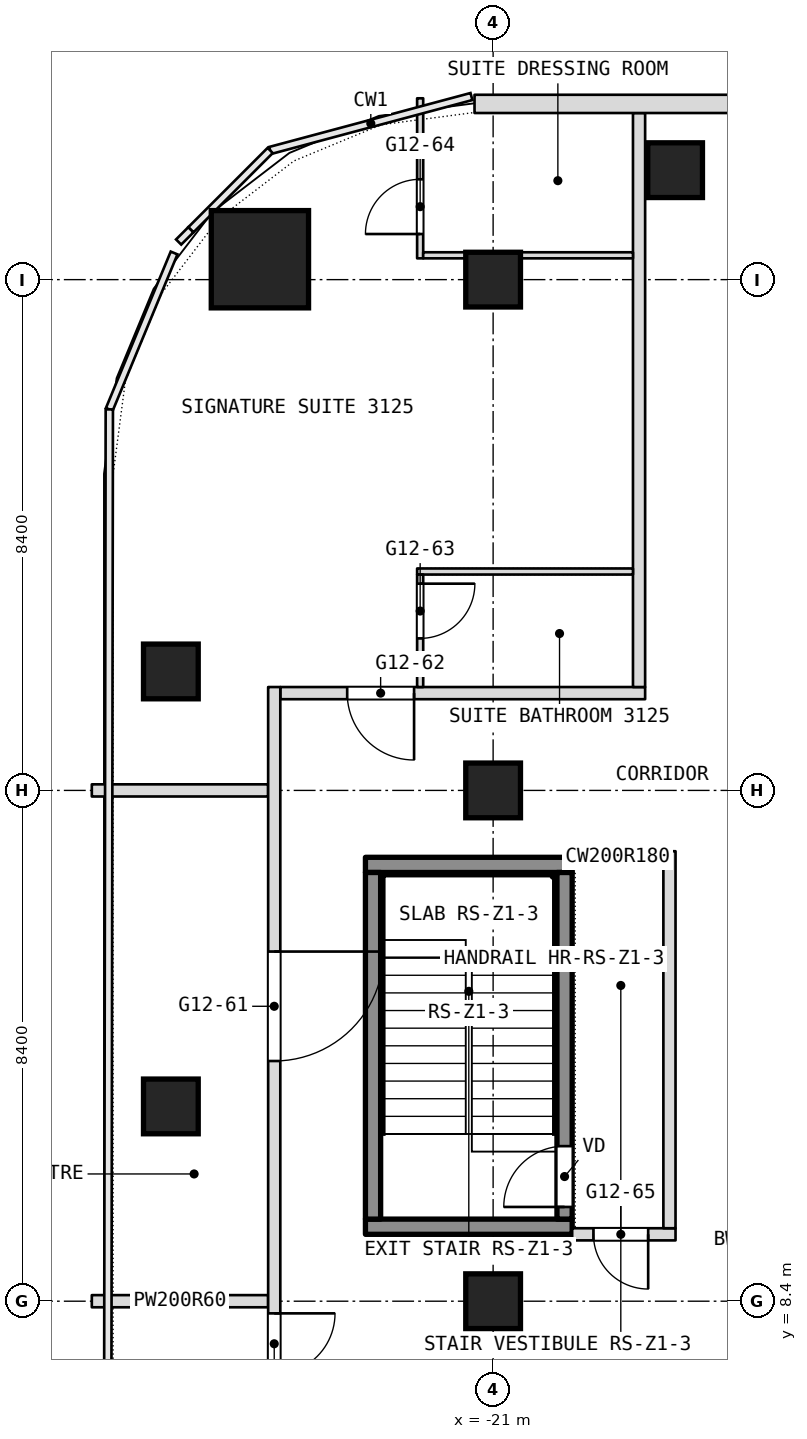
"""IFC4 building model, lengths in metres.
Left out: names, types, materials, properties, quantities, classifications, styles, units other than length and angle.
Written with IfcOpenShell. Run it as: python <this file> out.ifc"""

import sys

from ifc_helpers import new_model, si_unit, direction, frame, frame_2d, origin, origin_2d, place, context, subcontext, project, spatial, rectangle, extrude, element, fill, save


model = new_model("IFC4")
c1 = context("Model", 3, precision=1e-05, world=origin(), true_north=direction((0.0, 1.0)))
c2 = subcontext(c1, "Body", "Model", "MODEL_VIEW")
j1 = project(units=[si_unit("LENGTHUNIT", "METRE"), si_unit("PLANEANGLEUNIT", "RADIAN")], contexts=[c1])
p1 = place(None, origin())
s1 = spatial("IfcSite", under=j1, at=p1, CompositionType="ELEMENT")
p2 = place(p1, origin())
s2 = spatial("IfcBuilding", under=s1, at=p2, CompositionType="ELEMENT")
p3 = place(p2, frame((0.0, 0.0, 137.3)))
s3 = spatial("IfcBuildingStorey", under=s2, at=p3, CompositionType="ELEMENT", Elevation=137.3)
p4 = place(p3, frame((-24.835, 25.535, 0.0), z_axis=(0.0, 0.0, 1.0), x_axis=(1.0, 0.0, 0.0)))
e1 = element("IfcColumn", 1, at=p4, inside=s3, PredefinedType="COLUMN", context=c2, shape_type="SweptSolid", body=[
    extrude(rectangle(XDim=1.6, YDim=1.6, at=origin_2d()), origin(), (0.0, 0.0, 1.0), 3.6),
])
for number, where, z_axis, x_axis in (
    (2, (-21.0, 8.4, 0.0), (0.0, 0.0, 1.0), (1.0, 0.0, 0.0)),
    (3, (-21.0, 16.8, 0.0), (0.0, 0.0, 1.0), (1.0, 0.0, 0.0)),
    (4, (-21.0, 25.2, 0.0), (0.0, 0.0, 1.0), (1.0, 0.0, 0.0)),
    (5, (-26.3, 11.603, 0.0), (0.0, 0.0, 1.0), (1.0, 0.0, 0.0)),
    (6, (-26.3, 18.756, 0.0), (0.0, 0.0, 1.0), (1.0, 0.0, 0.0)),
    (7, (-18.007, 27.0, 0.0), (0.0, 0.0, 1.0), (1.0, 0.0, 0.0)),
):
    element("IfcColumn", number, at=place(p3, frame(where, z_axis=z_axis, x_axis=x_axis)), inside=s3, PredefinedType="COLUMN", context=c2, shape_type="SweptSolid", body=[
        extrude(rectangle(XDim=0.9, YDim=0.9, at=origin_2d()), origin(), (0.0, 0.0, 1.0), 3.6),
    ])
p5 = place(p3, frame((-27.6, 8.4, 0.0), z_axis=(0.0, 0.0, 1.0), x_axis=(1.0, 0.0, 0.0)))
e8 = element("IfcWall", 8, at=p5, inside=s3, PredefinedType="PARTITIONING", context=c2, shape_type="SweptSolid", body=[
    extrude(rectangle(XDim=2.9, YDim=0.2, at=frame_2d((1.45, 0.0))), origin(), (0.0, 0.0, 1.0), 2.89),
])
p6 = place(p3, frame((-19.7, 9.5, 0.0), z_axis=(0.0, 0.0, 1.0), x_axis=(1.0, 0.0, 0.0)))
e9 = element("IfcWall", 9, at=p6, inside=s3, PredefinedType="PARTITIONING", context=c2, shape_type="SweptSolid", body=[
    extrude(rectangle(XDim=1.7, YDim=0.2, at=frame_2d((0.85, 0.0))), origin(), (0.0, 0.0, 1.0), 3.34),
])
p7 = place(p6, frame((0.35, 0.0, 0.0)))
e10 = element("IfcOpeningElement", 10, at=p7, cuts=e9, PredefinedType="OPENING", context=c2, shape_type="SweptSolid", body=[
    extrude(rectangle(XDim=0.9, YDim=2.1, at=frame_2d((0.45, 1.05))), frame((0.0, 0.1, 0.0), z_axis=(0.0, -1.0, 0.0), x_axis=(1.0, 0.0, 0.0)), (0.0, 0.0, 1.0), 0.2),
])
p8 = place(p3, frame((-19.7, 15.7, 0.0), z_axis=(0.0, 0.0, 1.0), x_axis=(1.0, 0.0, 0.0)))
e11 = element("IfcWall", 11, at=p8, inside=s3, PredefinedType="PARTITIONING", context=c2, shape_type="SweptSolid", body=[
    extrude(rectangle(XDim=1.5, YDim=0.2, at=frame_2d((0.75, 0.0))), origin(), (0.0, 0.0, 1.0), 3.34),
])
p9 = place(p3, frame((-27.6, 16.8, 0.0), z_axis=(0.0, 0.0, 1.0), x_axis=(1.0, 0.0, 0.0)))
e12 = element("IfcWall", 12, at=p9, inside=s3, PredefinedType="PARTITIONING", context=c2, shape_type="SweptSolid", body=[
    extrude(rectangle(XDim=2.9, YDim=0.2, at=frame_2d((1.45, 0.0))), origin(), (0.0, 0.0, 1.0), 2.89),
])
p10 = place(p3, frame((-18.1, 9.6, 0.0), z_axis=(0.0, 0.0, 1.0), x_axis=(0.0, 1.0, 0.0)))
e13 = element("IfcWall", 13, at=p10, inside=s3, PredefinedType="PARTITIONING", context=c2, shape_type="SweptSolid", body=[
    extrude(rectangle(XDim=6.2, YDim=0.2, at=frame_2d((3.1, 0.0))), origin(), (0.0, 0.0, 1.0), 3.34),
])
p11 = place(p3, frame((-24.5, 18.4, 0.0), z_axis=(0.0, 0.0, 1.0), x_axis=(1.0, 0.0, 0.0)))
e14 = element("IfcWall", 14, at=p11, inside=s3, PredefinedType="PARTITIONING", context=c2, shape_type="SweptSolid", body=[
    extrude(rectangle(XDim=6.0, YDim=0.2, at=frame_2d((3.0, 0.0))), origin(), (0.0, 0.0, 1.0), 3.34),
])
p12 = place(p11, frame((1.1, 0.0, 0.0)))
e15 = element("IfcOpeningElement", 15, at=p12, cuts=e14, PredefinedType="OPENING", context=c2, shape_type="SweptSolid", body=[
    extrude(rectangle(XDim=1.1, YDim=2.1, at=frame_2d((0.55, 1.05))), frame((0.0, 0.1, 0.0), z_axis=(0.0, -1.0, 0.0), x_axis=(1.0, 0.0, 0.0)), (0.0, 0.0, 1.0), 0.2),
])
p13 = place(p3, frame((-18.6, 18.5, 0.0), z_axis=(0.0, 0.0, 1.0), x_axis=(0.0, 1.0, 0.0)))
e16 = element("IfcWall", 16, at=p13, inside=s3, PredefinedType="PARTITIONING", context=c2, shape_type="SweptSolid", body=[
    extrude(rectangle(XDim=9.44, YDim=0.2, at=frame_2d((4.72, 0.0))), origin(), (0.0, 0.0, 1.0), 3.34),
])
p14 = place(p3, frame((-22.25, 20.4, 0.0), z_axis=(0.0, 0.0, 1.0), x_axis=(1.0, 0.0, 0.0)))
e17 = element("IfcWall", 17, at=p14, inside=s3, PredefinedType="PARTITIONING", context=c2, shape_type="SweptSolid", body=[
    extrude(rectangle(XDim=3.55, YDim=0.1, at=frame_2d((1.775, 0.0))), origin(), (0.0, 0.0, 1.0), 3.34),
])
p15 = place(p3, frame((-22.2, 18.5, 0.0), z_axis=(0.0, 0.0, 1.0), x_axis=(0.0, 1.0, 0.0)))
e18 = element("IfcWall", 18, at=p15, inside=s3, PredefinedType="PARTITIONING", context=c2, shape_type="SweptSolid", body=[
    extrude(rectangle(XDim=1.85, YDim=0.1, at=frame_2d((0.925, 0.0))), origin(), (0.0, 0.0, 1.0), 3.34),
])
p16 = place(p15, frame((0.8, 0.0, 0.0)))
e19 = element("IfcOpeningElement", 19, at=p16, cuts=e18, PredefinedType="OPENING", context=c2, shape_type="SweptSolid", body=[
    extrude(rectangle(XDim=0.9, YDim=2.1, at=frame_2d((0.45, 1.05))), frame((0.0, 0.05, 0.0), z_axis=(0.0, -1.0, 0.0), x_axis=(1.0, 0.0, 0.0)), (0.0, 0.0, 1.0), 0.1),
])
p17 = place(p3, frame((-22.2, 25.55, 0.0), z_axis=(0.0, 0.0, 1.0), x_axis=(0.0, 1.0, 0.0)))
e20 = element("IfcWall", 20, at=p17, inside=s3, PredefinedType="PARTITIONING", context=c2, shape_type="SweptSolid", body=[
    extrude(rectangle(XDim=2.632, YDim=0.1, at=frame_2d((1.316, 0.0))), origin(), (0.0, 0.0, 1.0), 3.34),
])
p18 = place(p17, frame((0.4, 0.0, 0.0)))
e21 = element("IfcOpeningElement", 21, at=p18, cuts=e20, PredefinedType="OPENING", context=c2, shape_type="SweptSolid", body=[
    extrude(rectangle(XDim=0.9, YDim=2.1, at=frame_2d((0.45, 1.05))), frame((0.0, 0.05, 0.0), z_axis=(0.0, -1.0, 0.0), x_axis=(1.0, 0.0, 0.0)), (0.0, 0.0, 1.0), 0.1),
])
p19 = place(p3, frame((-24.6, 6.9, 0.0), z_axis=(0.0, 0.0, 1.0), x_axis=(0.0, 1.0, 0.0)))
e22 = element("IfcWall", 22, at=p19, inside=s3, PredefinedType="PARTITIONING", context=c2, shape_type="SweptSolid", body=[
    extrude(rectangle(XDim=11.6, YDim=0.2, at=frame_2d((5.8, 0.0))), origin(), (0.0, 0.0, 1.0), 3.34),
])
p20 = place(p19, frame((5.45, 0.0, 0.0)))
e23 = element("IfcOpeningElement", 23, at=p20, cuts=e22, PredefinedType="OPENING", context=c2, shape_type="SweptSolid", body=[
    extrude(rectangle(XDim=1.8, YDim=2.1, at=frame_2d((0.9, 1.05))), frame((0.0, 0.1, 0.0), z_axis=(0.0, -1.0, 0.0), x_axis=(1.0, 0.0, 0.0)), (0.0, 0.0, 1.0), 0.2),
])
p21 = place(p19, frame((0.3, 0.0, 0.0)))
e24 = element("IfcOpeningElement", 24, at=p21, cuts=e22, PredefinedType="OPENING", context=c2, shape_type="SweptSolid", body=[
    extrude(rectangle(XDim=1.0, YDim=2.1, at=frame_2d((0.5, 1.05))), frame((0.0, 0.1, 0.0), z_axis=(0.0, -1.0, 0.0), x_axis=(1.0, 0.0, 0.0)), (0.0, 0.0, 1.0), 0.2),
])
p22 = place(p3, frame((-22.15, 25.6, 0.0), z_axis=(0.0, 0.0, 1.0), x_axis=(1.0, 0.0, 0.0)))
e25 = element("IfcWall", 25, at=p22, inside=s3, PredefinedType="PARTITIONING", context=c2, shape_type="SweptSolid", body=[
    extrude(rectangle(XDim=3.45, YDim=0.1, at=frame_2d((1.725, 0.0))), origin(), (0.0, 0.0, 1.0), 3.34),
])
p23 = place(p3, frame((21.306, 28.09, 0.0), z_axis=(0.0, 0.0, 1.0), x_axis=(-1.0, 0.0, 0.0)))
e26 = element("IfcWall", 26, at=p23, inside=s3, PredefinedType="NOTDEFINED", context=c2, shape_type="SweptSolid", body=[
    extrude(rectangle(XDim=42.612, YDim=0.3, at=frame_2d((21.306, 0.0))), origin(), (0.0, 0.0, 1.0), 3.6),
])
p24 = place(p23, frame((5.406, 0.0, 0.9)))
e27 = element("IfcOpeningElement", 27, at=p24, cuts=e26, PredefinedType="OPENING", context=c2, shape_type="SweptSolid", body=[
    extrude(rectangle(XDim=2.4, YDim=2.1, at=frame_2d((1.2, 1.05))), frame((0.0, 0.15, 0.0), z_axis=(0.0, -1.0, 0.0), x_axis=(1.0, 0.0, 0.0)), (0.0, 0.0, 1.0), 0.3),
])
p25 = place(p23, frame((9.606, 0.0, 0.9)))
e28 = element("IfcOpeningElement", 28, at=p25, cuts=e26, PredefinedType="OPENING", context=c2, shape_type="SweptSolid", body=[
    extrude(rectangle(XDim=2.4, YDim=2.1, at=frame_2d((1.2, 1.05))), frame((0.0, 0.15, 0.0), z_axis=(0.0, -1.0, 0.0), x_axis=(1.0, 0.0, 0.0)), (0.0, 0.0, 1.0), 0.3),
])
p26 = place(p23, frame((13.806, 0.0, 0.9)))
e29 = element("IfcOpeningElement", 29, at=p26, cuts=e26, PredefinedType="OPENING", context=c2, shape_type="SweptSolid", body=[
    extrude(rectangle(XDim=2.4, YDim=2.1, at=frame_2d((1.2, 1.05))), frame((0.0, 0.15, 0.0), z_axis=(0.0, -1.0, 0.0), x_axis=(1.0, 0.0, 0.0)), (0.0, 0.0, 1.0), 0.3),
])
p27 = place(p23, frame((18.006, 0.0, 0.9)))
e30 = element("IfcOpeningElement", 30, at=p27, cuts=e26, PredefinedType="OPENING", context=c2, shape_type="SweptSolid", body=[
    extrude(rectangle(XDim=2.4, YDim=2.1, at=frame_2d((1.2, 1.05))), frame((0.0, 0.15, 0.0), z_axis=(0.0, -1.0, 0.0), x_axis=(1.0, 0.0, 0.0)), (0.0, 0.0, 1.0), 0.3),
])
p28 = place(p23, frame((22.206, 0.0, 0.9)))
e31 = element("IfcOpeningElement", 31, at=p28, cuts=e26, PredefinedType="OPENING", context=c2, shape_type="SweptSolid", body=[
    extrude(rectangle(XDim=2.4, YDim=2.1, at=frame_2d((1.2, 1.05))), frame((0.0, 0.15, 0.0), z_axis=(0.0, -1.0, 0.0), x_axis=(1.0, 0.0, 0.0)), (0.0, 0.0, 1.0), 0.3),
])
p29 = place(p23, frame((26.406, 0.0, 0.9)))
e32 = element("IfcOpeningElement", 32, at=p29, cuts=e26, PredefinedType="OPENING", context=c2, shape_type="SweptSolid", body=[
    extrude(rectangle(XDim=2.4, YDim=2.1, at=frame_2d((1.2, 1.05))), frame((0.0, 0.15, 0.0), z_axis=(0.0, -1.0, 0.0), x_axis=(1.0, 0.0, 0.0)), (0.0, 0.0, 1.0), 0.3),
])
p30 = place(p23, frame((30.606, 0.0, 0.9)))
e33 = element("IfcOpeningElement", 33, at=p30, cuts=e26, PredefinedType="OPENING", context=c2, shape_type="SweptSolid", body=[
    extrude(rectangle(XDim=2.4, YDim=2.1, at=frame_2d((1.2, 1.05))), frame((0.0, 0.15, 0.0), z_axis=(0.0, -1.0, 0.0), x_axis=(1.0, 0.0, 0.0)), (0.0, 0.0, 1.0), 0.3),
])
p31 = place(p23, frame((34.806, 0.0, 0.9)))
e34 = element("IfcOpeningElement", 34, at=p31, cuts=e26, PredefinedType="OPENING", context=c2, shape_type="SweptSolid", body=[
    extrude(rectangle(XDim=2.4, YDim=2.1, at=frame_2d((1.2, 1.05))), frame((0.0, 0.15, 0.0), z_axis=(0.0, -1.0, 0.0), x_axis=(1.0, 0.0, 0.0)), (0.0, 0.0, 1.0), 0.3),
])
for number, where, z_axis, x_axis in (
    (35, (-23.1, 9.625, 0.1), (0.0, 0.0, 1.0), (1.0, 0.0, 0.0)),
    (36, (-23.1, 15.575, 0.1), (0.0, 0.0, 1.0), (1.0, 0.0, 0.0)),
):
    element("IfcWall", number, at=place(p3, frame(where, z_axis=z_axis, x_axis=x_axis)), inside=s3, PredefinedType="SHEAR", context=c2, shape_type="SweptSolid", body=[
        extrude(rectangle(XDim=3.4, YDim=0.25, at=frame_2d((1.7, 0.0))), origin(), (0.0, 0.0, 1.0), 3.6),
    ])
p32 = place(p3, frame((-22.975, 9.75, 0.1), z_axis=(0.0, 0.0, 1.0), x_axis=(0.0, 1.0, 0.0)))
e37 = element("IfcWall", 37, at=p32, inside=s3, PredefinedType="SHEAR", context=c2, shape_type="SweptSolid", body=[
    extrude(rectangle(XDim=5.7, YDim=0.25, at=frame_2d((2.85, 0.0))), origin(), (0.0, 0.0, 1.0), 3.6),
])
p33 = place(p3, frame((-19.825, 9.75, 0.1), z_axis=(0.0, 0.0, 1.0), x_axis=(0.0, 1.0, 0.0)))
e38 = element("IfcWall", 38, at=p33, inside=s3, PredefinedType="SHEAR", context=c2, shape_type="SweptSolid", body=[
    extrude(rectangle(XDim=5.7, YDim=0.25, at=frame_2d((2.85, 0.0))), origin(), (0.0, 0.0, 1.0), 3.6),
])
p34 = place(p33, frame((0.2, 0.0, 0.0)))
e39 = element("IfcOpeningElement", 39, at=p34, cuts=e38, PredefinedType="OPENING", context=c2, shape_type="SweptSolid", body=[
    extrude(rectangle(XDim=1.0, YDim=2.1, at=frame_2d((0.5, 1.05))), frame((0.0, 0.125, 0.0), z_axis=(0.0, -1.0, 0.0), x_axis=(1.0, 0.0, 0.0)), (0.0, 0.0, 1.0), 0.25),
])
p35 = place(p7, origin())
e40 = element("IfcDoor", 40, at=p35, inside=s3, OperationType="SINGLE_SWING_RIGHT", PredefinedType="DOOR", context=c2, shape_type="SweptSolid", body=[
    extrude(rectangle(XDim=0.9, YDim=2.1, at=frame_2d((0.45, 1.05))), frame((0.0, 0.025, 0.0), z_axis=(0.0, -1.0, 0.0), x_axis=(1.0, 0.0, 0.0)), (0.0, 0.0, 1.0), 0.05),
])
fill(e10, e40)
p36 = place(p12, origin())
e41 = element("IfcDoor", 41, at=p36, inside=s3, OperationType="SINGLE_SWING_RIGHT", PredefinedType="DOOR", context=c2, shape_type="SweptSolid", body=[
    extrude(rectangle(XDim=1.1, YDim=2.1, at=frame_2d((0.55, 1.05))), frame((0.0, 0.025, 0.0), z_axis=(0.0, -1.0, 0.0), x_axis=(1.0, 0.0, 0.0)), (0.0, 0.0, 1.0), 0.05),
])
fill(e15, e41)
p37 = place(p16, origin())
e42 = element("IfcDoor", 42, at=p37, inside=s3, OperationType="SINGLE_SWING_LEFT", PredefinedType="DOOR", context=c2, shape_type="SweptSolid", body=[
    extrude(rectangle(XDim=0.9, YDim=2.1, at=frame_2d((0.45, 1.05))), frame((0.0, 0.025, 0.0), z_axis=(0.0, -1.0, 0.0), x_axis=(1.0, 0.0, 0.0)), (0.0, 0.0, 1.0), 0.05),
])
fill(e19, e42)
p38 = place(p18, origin())
e43 = element("IfcDoor", 43, at=p38, inside=s3, OperationType="SINGLE_SWING_RIGHT", PredefinedType="DOOR", context=c2, shape_type="SweptSolid", body=[
    extrude(rectangle(XDim=0.9, YDim=2.1, at=frame_2d((0.45, 1.05))), frame((0.0, 0.025, 0.0), z_axis=(0.0, -1.0, 0.0), x_axis=(1.0, 0.0, 0.0)), (0.0, 0.0, 1.0), 0.05),
])
fill(e21, e43)
p39 = place(p20, origin())
e44 = element("IfcDoor", 44, at=p39, inside=s3, OperationType="DOUBLE_DOOR_SINGLE_SWING", PredefinedType="DOOR", context=c2, shape_type="SweptSolid", body=[
    extrude(rectangle(XDim=1.8, YDim=2.1, at=frame_2d((0.9, 1.05))), frame((0.0, 0.025, 0.0), z_axis=(0.0, -1.0, 0.0), x_axis=(1.0, 0.0, 0.0)), (0.0, 0.0, 1.0), 0.05),
])
fill(e23, e44)
p40 = place(p21, origin())
e45 = element("IfcDoor", 45, at=p40, inside=s3, OperationType="SINGLE_SWING_LEFT", PredefinedType="DOOR", context=c2, shape_type="SweptSolid", body=[
    extrude(rectangle(XDim=1.0, YDim=2.1, at=frame_2d((0.5, 1.05))), frame((0.0, 0.025, 0.0), z_axis=(0.0, -1.0, 0.0), x_axis=(1.0, 0.0, 0.0)), (0.0, 0.0, 1.0), 0.05),
])
fill(e24, e45)
p41 = place(p34, origin())
e46 = element("IfcDoor", 46, at=p41, inside=s3, OperationType="SINGLE_SWING_LEFT", PredefinedType="DOOR", context=c2, shape_type="SweptSolid", body=[
    extrude(rectangle(XDim=1.0, YDim=2.1, at=frame_2d((0.5, 1.05))), frame((0.0, 0.025, 0.0), z_axis=(0.0, -1.0, 0.0), x_axis=(1.0, 0.0, 0.0)), (0.0, 0.0, 1.0), 0.05),
])
fill(e39, e46)
save(model, sys.argv[1])
